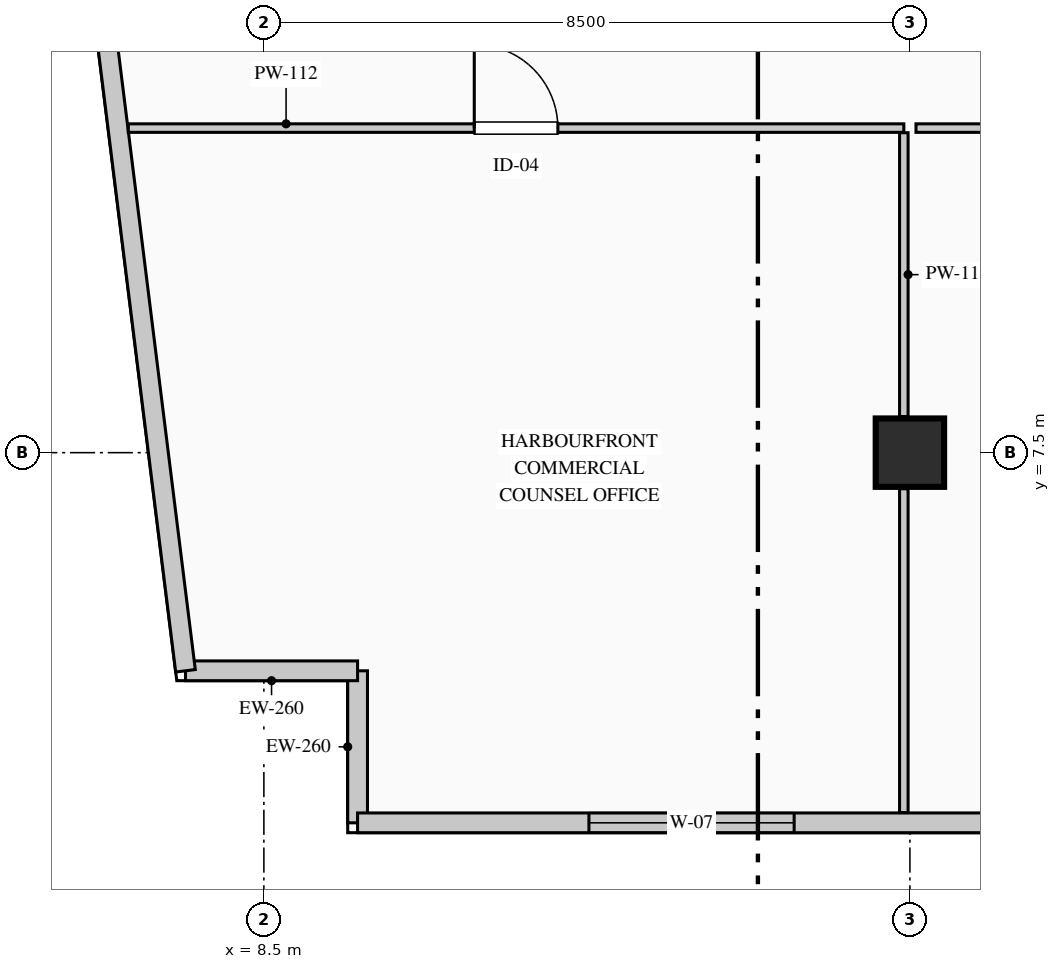
"""IFC4 building model, lengths in metres.
Left out: names, types, materials, properties, quantities, classifications, styles, units other than length and angle.
Written with IfcOpenShell. Run it as: python <this file> out.ifc"""

import sys

from ifc_helpers import new_model, si_unit, direction, frame, frame_2d, origin, origin_2d, place, context, subcontext, project, spatial, rectangle, extrude, element, fill, save


model = new_model("IFC4")
c1 = context("Model", 3, precision=1e-05, world=origin(), true_north=direction((0.0, 1.0)))
c2 = subcontext(c1, "Body", "Model", "MODEL_VIEW")
j1 = project(units=[si_unit("LENGTHUNIT", "METRE"), si_unit("PLANEANGLEUNIT", "RADIAN")], contexts=[c1])
p1 = place(None, origin())
s1 = spatial("IfcSite", under=j1, at=p1, CompositionType="ELEMENT")
p2 = place(p1, origin())
s2 = spatial("IfcBuilding", under=s1, at=p2, CompositionType="ELEMENT")
p3 = place(p2, frame((0.0, 0.0, 191.65)))
s3 = spatial("IfcBuildingStorey", under=s2, at=p3, CompositionType="ELEMENT", Elevation=191.65)
p4 = place(p3, frame((17.0, 7.5, 0.0), z_axis=(0.0, 0.0, 1.0), x_axis=(1.0, 0.0, 0.0)))
e1 = element("IfcColumn", 1, at=p4, inside=s3, PredefinedType="COLUMN", context=c2, shape_type="SweptSolid", body=[
    extrude(rectangle(XDim=0.9, YDim=0.9, at=origin_2d()), origin(), (0.0, 0.0, 1.0), 3.95),
])
p5 = place(p3, frame((9.733, 2.63, 0.0), z_axis=(0.0, 0.0, 1.0), x_axis=(0.0, 1.0, 0.0)))
e2 = element("IfcWall", 2, at=p5, inside=s3, PredefinedType="STANDARD", context=c2, shape_type="SweptSolid", body=[
    extrude(rectangle(XDim=2.0, YDim=0.26, at=frame_2d((1.0, 0.0))), origin(), (0.0, 0.0, 1.0), 3.7),
])
p6 = place(p3, frame((9.733, 4.63, 0.0), z_axis=(0.0, 0.0, 1.0), x_axis=(-1.0, 0.0, 0.0)))
e3 = element("IfcWall", 3, at=p6, inside=s3, PredefinedType="STANDARD", context=c2, shape_type="SweptSolid", body=[
    extrude(rectangle(XDim=2.264, YDim=0.26, at=frame_2d((1.132, 0.0))), origin(), (0.0, 0.0, 1.0), 3.7),
])
p7 = place(p3, frame((7.469, 4.63, 0.0), z_axis=(0.0, 0.0, 1.0), x_axis=(-0.123515300309, 0.992342667928, 0.0)))
e4 = element("IfcWall", 4, at=p7, inside=s3, PredefinedType="STANDARD", context=c2, shape_type="SweptSolid", body=[
    extrude(rectangle(XDim=37.024, YDim=0.26, at=frame_2d((18.512, 0.0))), origin(), (0.0, 0.0, 1.0), 3.7),
])
p8 = place(p7, frame((11.978, 0.0, 0.9)))
e5 = element("IfcOpeningElement", 5, at=p8, cuts=e4, PredefinedType="OPENING", context=c2, shape_type="SweptSolid", body=[
    extrude(rectangle(XDim=2.7, YDim=2.1, at=frame_2d((1.35, 1.05))), frame((0.0, 0.14, 0.0), z_axis=(0.0, -1.0, 0.0), x_axis=(1.0, 0.0, 0.0)), (0.0, 0.0, 1.0), 0.28),
])
p9 = place(p3, frame((21.937, 2.63, 0.0), z_axis=(0.0, 0.0, 1.0), x_axis=(-1.0, 0.0, 0.0)))
e6 = element("IfcWall", 6, at=p9, inside=s3, PredefinedType="STANDARD", context=c2, shape_type="SweptSolid", body=[
    extrude(rectangle(XDim=12.204, YDim=0.26, at=frame_2d((6.102, 0.0))), origin(), (0.0, 0.0, 1.0), 3.7),
])
p10 = place(p9, frame((6.46, 0.0, 0.9)))
e7 = element("IfcOpeningElement", 7, at=p10, cuts=e6, PredefinedType="OPENING", context=c2, shape_type="SweptSolid", body=[
    extrude(rectangle(XDim=2.7, YDim=2.1, at=frame_2d((1.35, 1.05))), frame((0.0, 0.14, 0.0), z_axis=(0.0, -1.0, 0.0), x_axis=(1.0, 0.0, 0.0)), (0.0, 0.0, 1.0), 0.28),
])
p11 = place(p3, frame((6.716, 11.77, 0.0), z_axis=(0.0, 0.0, 1.0), x_axis=(1.0, 0.0, 0.0)))
e8 = element("IfcWall", 8, at=p11, inside=s3, PredefinedType="PARTITIONING", context=c2, shape_type="SweptSolid", body=[
    extrude(rectangle(XDim=10.204, YDim=0.112, at=frame_2d((5.102, 0.0))), origin(), (0.0, 0.0, 1.0), 3.7),
])
p12 = place(p11, frame((4.552, 0.0, 0.0)))
e9 = element("IfcOpeningElement", 9, at=p12, cuts=e8, PredefinedType="OPENING", context=c2, shape_type="SweptSolid", body=[
    extrude(rectangle(XDim=1.1, YDim=2.2, at=frame_2d((0.55, 1.1))), frame((0.0, 0.066, 0.0), z_axis=(0.0, -1.0, 0.0), x_axis=(1.0, 0.0, 0.0)), (0.0, 0.0, 1.0), 0.132),
])
p13 = place(p3, frame((16.92, 11.709, 0.0), z_axis=(0.0, 0.0, 1.0), x_axis=(0.0, -1.0, 0.0)))
e10 = element("IfcWall", 10, at=p13, inside=s3, PredefinedType="PARTITIONING", context=c2, shape_type="SweptSolid", body=[
    extrude(rectangle(XDim=3.734, YDim=0.112, at=frame_2d((1.867, 0.0))), origin(), (0.0, 0.0, 1.0), 3.085),
])
p14 = place(p3, frame((16.92, 7.025, 0.0), z_axis=(0.0, 0.0, 1.0), x_axis=(0.0, -1.0, 0.0)))
e11 = element("IfcWall", 11, at=p14, inside=s3, PredefinedType="PARTITIONING", context=c2, shape_type="SweptSolid", body=[
    extrude(rectangle(XDim=4.26, YDim=0.112, at=frame_2d((2.13, 0.0))), origin(), (0.0, 0.0, 1.0), 3.7),
])
p15 = place(p3, frame((17.08, 11.77, 0.0), z_axis=(0.0, 0.0, 1.0), x_axis=(1.0, 0.0, 0.0)))
e12 = element("IfcWall", 12, at=p15, inside=s3, PredefinedType="PARTITIONING", context=c2, shape_type="SweptSolid", body=[
    extrude(rectangle(XDim=5.435, YDim=0.112, at=frame_2d((2.717, 0.0))), origin(), (0.0, 0.0, 1.0), 3.7),
])
p16 = place(p15, frame((1.512, 0.0, 0.0)))
e13 = element("IfcOpeningElement", 13, at=p16, cuts=e12, PredefinedType="OPENING", context=c2, shape_type="SweptSolid", body=[
    extrude(rectangle(XDim=1.1, YDim=2.2, at=frame_2d((0.55, 1.1))), frame((0.0, 0.066, 0.0), z_axis=(0.0, -1.0, 0.0), x_axis=(1.0, 0.0, 0.0)), (0.0, 0.0, 1.0), 0.132),
])
p17 = place(p10, origin())
e14 = element("IfcWindow", 14, at=p17, inside=s3, PartitioningType="DOUBLE_PANEL_VERTICAL", PredefinedType="WINDOW", context=c2, shape_type="SweptSolid", body=[
    extrude(rectangle(XDim=2.7, YDim=2.1, at=frame_2d((1.35, 1.05))), frame((0.0, 0.03, 0.0), z_axis=(0.0, -1.0, 0.0), x_axis=(1.0, 0.0, 0.0)), (0.0, 0.0, 1.0), 0.06),
])
fill(e7, e14)
p18 = place(p12, origin())
e15 = element("IfcDoor", 15, at=p18, inside=s3, OperationType="SINGLE_SWING_LEFT", PredefinedType="DOOR", context=c2, shape_type="SweptSolid", body=[
    extrude(rectangle(XDim=1.1, YDim=2.2, at=frame_2d((0.55, 1.1))), frame((0.0, 0.025, 0.0), z_axis=(0.0, -1.0, 0.0), x_axis=(1.0, 0.0, 0.0)), (0.0, 0.0, 1.0), 0.05),
])
fill(e9, e15)
save(model, sys.argv[1])
